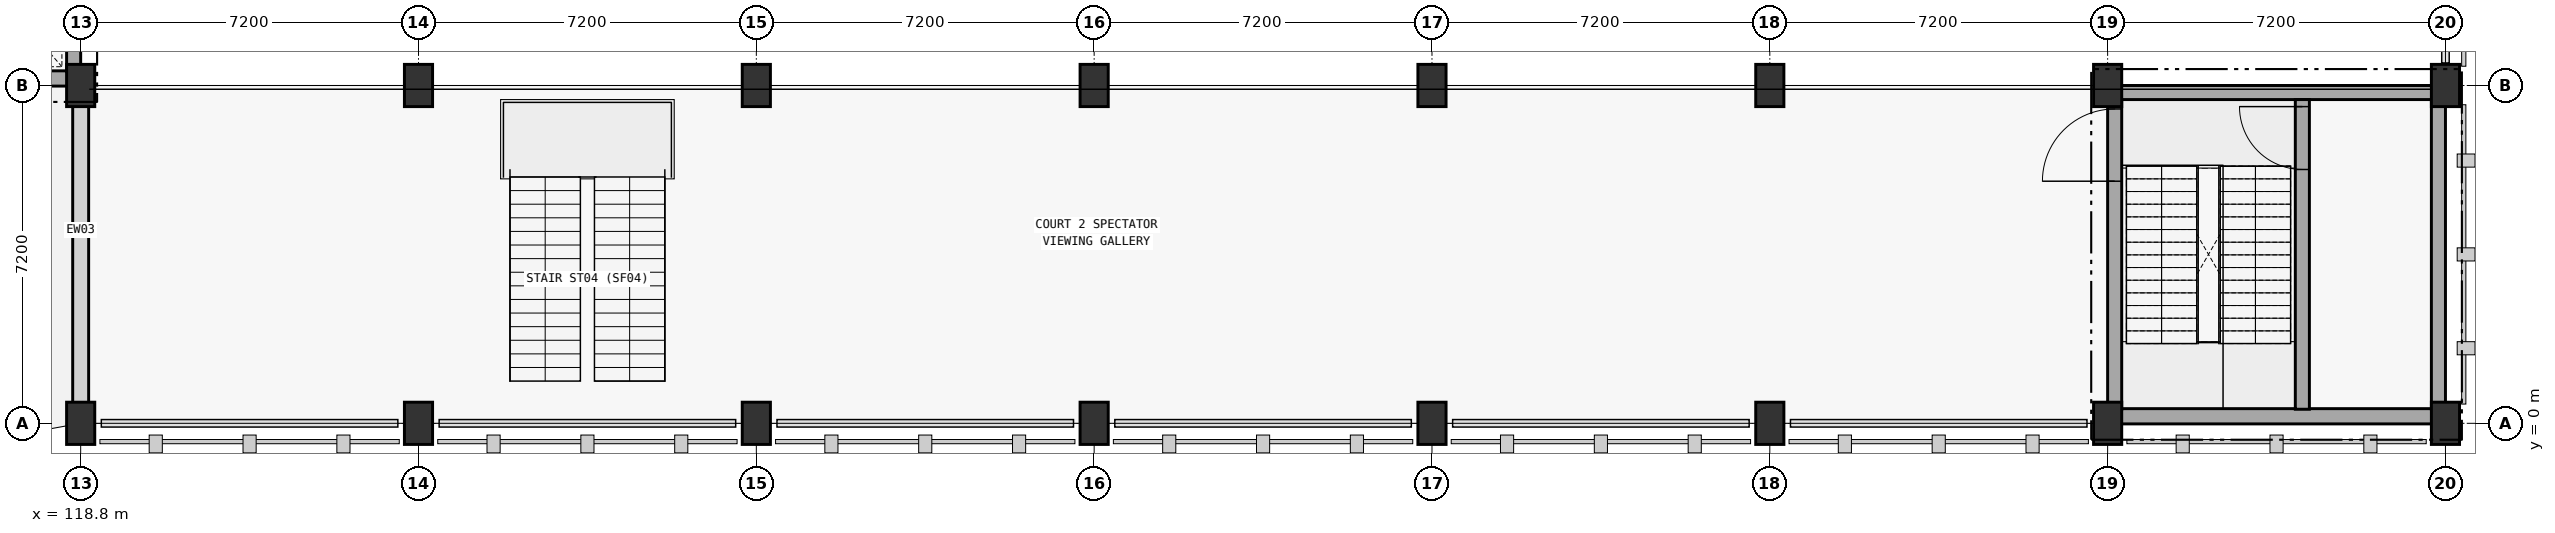
"""IFC4 building model, lengths in metres.
Left out: names, types, materials, properties, quantities, classifications, styles, units other than length and angle.
Written with IfcOpenShell. Run it as: python <this file> out.ifc"""

import sys

from ifc_helpers import new_model, si_unit, direction, frame, frame_2d, origin, origin_2d, place, context, subcontext, project, spatial, rectangle, extrude, element, fill, save


model = new_model("IFC4")
c1 = context("Model", 3, precision=1e-05, world=origin(), true_north=direction((0.0, 1.0)))
c2 = subcontext(c1, "Body", "Model", "MODEL_VIEW")
j1 = project(units=[si_unit("LENGTHUNIT", "METRE"), si_unit("PLANEANGLEUNIT", "RADIAN")], contexts=[c1])
p1 = place(None, origin())
s1 = spatial("IfcSite", under=j1, at=p1, CompositionType="ELEMENT")
p2 = place(p1, origin())
s2 = spatial("IfcBuilding", under=s1, at=p2, CompositionType="ELEMENT")
p3 = place(p2, frame((0.0, 0.0, 5.4)))
s3 = spatial("IfcBuildingStorey", under=s2, at=p3, CompositionType="ELEMENT", Elevation=5.4)
for number, where, z_axis, x_axis in (
    (1, (118.8, 0.0, 0.0), (0.0, 0.0, 1.0), (1.0, 0.0, 0.0)),
    (2, (118.8, 7.2, 0.0), (0.0, 0.0, 1.0), (1.0, 0.0, 0.0)),
    (3, (126.0, 0.0, 0.0), (0.0, 0.0, 1.0), (1.0, 0.0, 0.0)),
    (4, (126.0, 7.2, 0.0), (0.0, 0.0, 1.0), (1.0, 0.0, 0.0)),
    (5, (133.2, 0.0, 0.0), (0.0, 0.0, 1.0), (1.0, 0.0, 0.0)),
    (6, (133.2, 7.2, 0.0), (0.0, 0.0, 1.0), (1.0, 0.0, 0.0)),
    (7, (140.4, 0.0, 0.0), (0.0, 0.0, 1.0), (1.0, 0.0, 0.0)),
    (8, (140.4, 7.2, 0.0), (0.0, 0.0, 1.0), (1.0, 0.0, 0.0)),
    (9, (147.6, 0.0, 0.0), (0.0, 0.0, 1.0), (1.0, 0.0, 0.0)),
    (10, (147.6, 7.2, 0.0), (0.0, 0.0, 1.0), (1.0, 0.0, 0.0)),
    (11, (154.8, 0.0, 0.0), (0.0, 0.0, 1.0), (1.0, 0.0, 0.0)),
    (12, (154.8, 7.2, 0.0), (0.0, 0.0, 1.0), (1.0, 0.0, 0.0)),
    (13, (162.0, 0.0, 0.0), (0.0, 0.0, 1.0), (1.0, 0.0, 0.0)),
    (14, (162.0, 7.2, 0.0), (0.0, 0.0, 1.0), (1.0, 0.0, 0.0)),
    (15, (169.2, 0.0, 0.0), (0.0, 0.0, 1.0), (1.0, 0.0, 0.0)),
    (16, (169.2, 7.2, 0.0), (0.0, 0.0, 1.0), (1.0, 0.0, 0.0)),
):
    element("IfcColumn", number, at=place(p3, frame(where, z_axis=z_axis, x_axis=x_axis)), inside=s3, PredefinedType="COLUMN", context=c2, shape_type="SweptSolid", body=[
        extrude(rectangle(XDim=0.6, YDim=0.9, at=origin_2d()), origin(), (0.0, 0.0, 1.0), 5.4),
    ])
p4 = place(p3, frame((118.8, 7.35, 0.0), z_axis=(0.0, 0.0, 1.0), x_axis=(-1.0, 0.0, 0.0)))
e17 = element("IfcWall", 17, at=p4, inside=s3, PredefinedType="SHEAR", context=c2, shape_type="SweptSolid", body=[
    extrude(rectangle(XDim=7.2, YDim=0.325, at=frame_2d((3.6, 0.0))), origin(), (0.0, 0.0, 1.0), 5.4),
])
p5 = place(p3, frame((118.65, 17.7, 0.0), z_axis=(0.0, 0.0, 1.0), x_axis=(0.0, -1.0, 0.0)))
e18 = element("IfcWall", 18, at=p5, inside=s3, PredefinedType="SHEAR", context=c2, shape_type="SweptSolid", body=[
    extrude(rectangle(XDim=10.2, YDim=0.3, at=frame_2d((5.1, 0.0))), origin(), (0.0, 0.0, 1.0), 5.4),
])
p6 = place(p3, frame((169.2, 0.15, 0.0), z_axis=(0.0, 0.0, 1.0), x_axis=(-1.0, 0.0, 0.0)))
e19 = element("IfcWall", 19, at=p6, inside=s3, PredefinedType="SHEAR", context=c2, shape_type="SweptSolid", body=[
    extrude(rectangle(XDim=7.2, YDim=0.325, at=frame_2d((3.6, 0.0))), origin(), (0.0, 0.0, 1.0), 5.4),
])
p7 = place(p3, frame((162.0, 7.05, 0.0), z_axis=(0.0, 0.0, 1.0), x_axis=(1.0, 0.0, 0.0)))
e20 = element("IfcWall", 20, at=p7, inside=s3, PredefinedType="SHEAR", context=c2, shape_type="SweptSolid", body=[
    extrude(rectangle(XDim=7.2, YDim=0.3, at=frame_2d((3.6, 0.0))), origin(), (0.0, 0.0, 1.0), 5.4),
])
p8 = place(p3, frame((162.15, 0.3, 0.0), z_axis=(0.0, 0.0, 1.0), x_axis=(0.0, 1.0, 0.0)))
e21 = element("IfcWall", 21, at=p8, inside=s3, PredefinedType="SHEAR", context=c2, shape_type="SweptSolid", body=[
    extrude(rectangle(XDim=6.6, YDim=0.3, at=frame_2d((3.3, 0.0))), origin(), (0.0, 0.0, 1.0), 5.4),
])
p9 = place(p8, frame((4.86, 0.0, 0.0)))
e22 = element("IfcOpeningElement", 22, at=p9, cuts=e21, PredefinedType="OPENING", context=c2, shape_type="SweptSolid", body=[
    extrude(rectangle(XDim=1.54, YDim=2.22, at=frame_2d((0.77, 1.11))), frame((0.0, 0.15, 0.0), z_axis=(0.0, -1.0, 0.0), x_axis=(1.0, 0.0, 0.0)), (0.0, 0.0, 1.0), 0.3),
])
p10 = place(p3, frame((169.05, 6.9, 0.0), z_axis=(0.0, 0.0, 1.0), x_axis=(0.0, -1.0, 0.0)))
e23 = element("IfcWall", 23, at=p10, inside=s3, PredefinedType="SHEAR", context=c2, shape_type="SweptSolid", body=[
    extrude(rectangle(XDim=6.6, YDim=0.3, at=frame_2d((3.3, 0.0))), origin(), (0.0, 0.0, 1.0), 5.4),
])
p11 = place(p3, frame((166.15, 0.3, 0.0), z_axis=(0.0, 0.0, 1.0), x_axis=(0.0, 1.0, 0.0)))
e24 = element("IfcWall", 24, at=p11, inside=s3, PredefinedType="SHEAR", context=c2, shape_type="SweptSolid", body=[
    extrude(rectangle(XDim=6.6, YDim=0.3, at=frame_2d((3.3, 0.0))), origin(), (0.0, 0.0, 1.0), 5.4),
])
p12 = place(p11, frame((5.11, 0.0, 0.0)))
e25 = element("IfcOpeningElement", 25, at=p12, cuts=e24, PredefinedType="OPENING", context=c2, shape_type="SweptSolid", body=[
    extrude(rectangle(XDim=1.34, YDim=2.18, at=frame_2d((0.67, 1.09))), frame((0.0, 0.15, 0.0), z_axis=(0.0, -1.0, 0.0), x_axis=(1.0, 0.0, 0.0)), (0.0, 0.0, 1.0), 0.3),
])
p13 = place(p3, frame((118.8, 0.44, 0.0), z_axis=(0.0, 0.0, 1.0), x_axis=(0.0, 1.0, 0.0)))
e26 = element("IfcWall", 26, at=p13, inside=s3, PredefinedType="STANDARD", context=c2, shape_type="SweptSolid", body=[
    extrude(rectangle(XDim=6.32, YDim=0.34, at=frame_2d((3.16, 0.0))), origin(), (0.0, 0.0, 1.0), 4.515),
])
p14 = place(p12, origin())
e27 = element("IfcDoor", 27, at=p14, inside=s3, OperationType="SINGLE_SWING_RIGHT", PredefinedType="DOOR", context=c2, shape_type="SweptSolid", body=[
    extrude(rectangle(XDim=1.34, YDim=2.18, at=frame_2d((0.67, 1.09))), frame((0.0, 0.025, 0.0), z_axis=(0.0, -1.0, 0.0), x_axis=(1.0, 0.0, 0.0)), (0.0, 0.0, 1.0), 0.05),
])
fill(e25, e27)
p15 = place(p9, origin())
e28 = element("IfcDoor", 28, at=p15, inside=s3, OperationType="SINGLE_SWING_LEFT", PredefinedType="DOOR", context=c2, shape_type="SweptSolid", body=[
    extrude(rectangle(XDim=1.54, YDim=2.22, at=frame_2d((0.77, 1.11))), frame((0.0, 0.025, 0.0), z_axis=(0.0, -1.0, 0.0), x_axis=(1.0, 0.0, 0.0)), (0.0, 0.0, 1.0), 0.05),
])
fill(e22, e28)
save(model, sys.argv[1])
